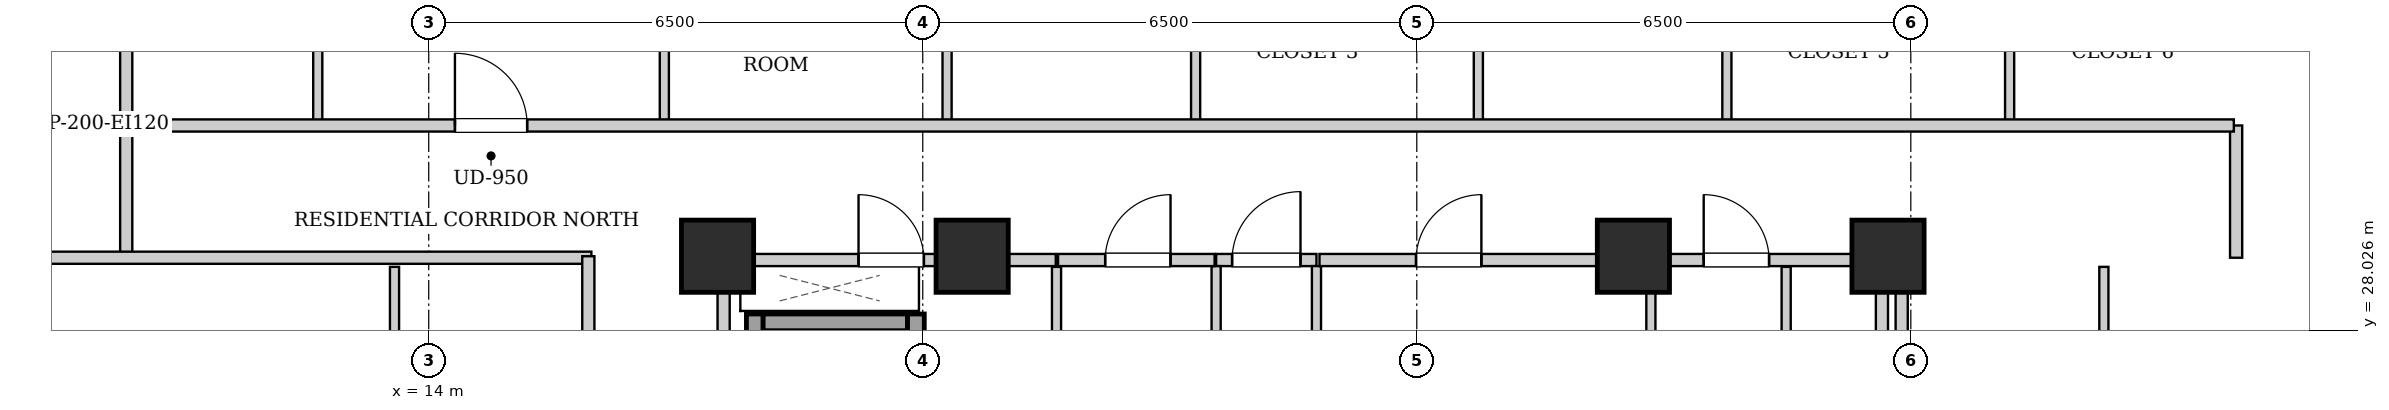
"""IFC4 building model, lengths in metres.
Left out: names, types, materials, properties, quantities, classifications, styles, units other than length and angle.
Written with IfcOpenShell. Run it as: python <this file> out.ifc"""

import sys

from ifc_helpers import new_model, si_unit, direction, frame, frame_2d, origin, origin_2d, place, context, subcontext, project, spatial, rectangle, extrude, element, fill, save


model = new_model("IFC4")
c1 = context("Model", 3, precision=1e-05, world=origin(), true_north=direction((0.0, 1.0)))
c2 = subcontext(c1, "Body", "Model", "MODEL_VIEW")
j1 = project(units=[si_unit("LENGTHUNIT", "METRE"), si_unit("PLANEANGLEUNIT", "RADIAN")], contexts=[c1])
p1 = place(None, origin())
s1 = spatial("IfcSite", under=j1, at=p1, CompositionType="ELEMENT")
p2 = place(p1, origin())
s2 = spatial("IfcBuilding", under=s1, at=p2, CompositionType="ELEMENT")
p3 = place(p2, frame((0.0, 0.0, 153.65)))
s3 = spatial("IfcBuildingStorey", under=s2, at=p3, CompositionType="ELEMENT", Elevation=153.65)
for number, where, z_axis, x_axis in (
    (1, (17.8, 29.0, 0.0), (0.0, 0.0, 1.0), (1.0, 0.0, 0.0)),
    (2, (21.15, 29.0, 0.0), (0.0, 0.0, 1.0), (1.0, 0.0, 0.0)),
    (3, (29.85, 29.0, 0.0), (0.0, 0.0, 1.0), (1.0, 0.0, 0.0)),
    (4, (33.2, 29.0, 0.0), (0.0, 0.0, 1.0), (1.0, 0.0, 0.0)),
):
    element("IfcColumn", number, at=place(p3, frame(where, z_axis=z_axis, x_axis=x_axis)), inside=s3, PredefinedType="COLUMN", context=c2, shape_type="SweptSolid", body=[
        extrude(rectangle(XDim=0.95, YDim=0.95, at=origin_2d()), origin(), (0.0, 0.0, 1.0), 3.25),
    ])
p4 = place(p3, frame((18.29, 24.1, 0.0), z_axis=(0.0, 0.0, 1.0), x_axis=(0.0, 1.0, 0.0)))
e5 = element("IfcWall", 5, at=p4, inside=s3, PredefinedType="SHEAR", context=c2, shape_type="SweptSolid", body=[
    extrude(rectangle(XDim=4.14, YDim=0.22, at=frame_2d((2.07, 0.0))), origin(), (0.0, 0.0, 1.0), 2.99),
])
p5 = place(p3, frame((18.4, 28.13, 0.0), z_axis=(0.0, 0.0, 1.0), x_axis=(1.0, 0.0, 0.0)))
e6 = element("IfcWall", 6, at=p5, inside=s3, PredefinedType="SHEAR", context=c2, shape_type="SweptSolid", body=[
    extrude(rectangle(XDim=1.9, YDim=0.22, at=frame_2d((0.95, 0.0))), origin(), (0.0, 0.0, 1.0), 2.99),
])
p6 = place(p3, frame((20.41, 26.06, 0.0), z_axis=(0.0, 0.0, 1.0), x_axis=(0.0, 1.0, 0.0)))
e7 = element("IfcWall", 7, at=p6, inside=s3, PredefinedType="SHEAR", context=c2, shape_type="SweptSolid", body=[
    extrude(rectangle(XDim=2.18, YDim=0.22, at=frame_2d((1.09, 0.0))), origin(), (0.0, 0.0, 1.0), 2.99),
])
for number, where, z_axis, x_axis in (
    (8, (17.88, 24.12, 0.0), (0.0, 0.0, 1.0), (0.0, 1.0, 0.0)),
    (9, (33.12, 24.12, 0.0), (0.0, 0.0, 1.0), (0.0, 1.0, 0.0)),
):
    element("IfcWall", number, at=place(p3, frame(where, z_axis=z_axis, x_axis=x_axis)), inside=s3, PredefinedType="PARTITIONING", context=c2, shape_type="SweptSolid", body=[
        extrude(rectangle(XDim=4.76, YDim=0.16, at=frame_2d((2.38, 0.0))), origin(), (0.0, 0.0, 1.0), 2.99),
    ])
p7 = place(p3, frame((24.36, 28.95, 0.0), z_axis=(0.0, 0.0, 1.0), x_axis=(1.0, 0.0, 0.0)))
e10 = element("IfcWall", 10, at=p7, inside=s3, PredefinedType="PARTITIONING", context=c2, shape_type="SweptSolid", body=[
    extrude(rectangle(XDim=1.32, YDim=0.16, at=frame_2d((0.66, 0.0))), origin(), (0.0, 0.0, 1.0), 2.442),
])
p8 = place(p7, frame((0.21, 0.0, 0.0)))
e11 = element("IfcOpeningElement", 11, at=p8, cuts=e10, PredefinedType="OPENING", context=c2, shape_type="SweptSolid", body=[
    extrude(rectangle(XDim=0.9, YDim=2.05, at=frame_2d((0.45, 1.025))), frame((0.0, 0.09, 0.0), z_axis=(0.0, -1.0, 0.0), x_axis=(1.0, 0.0, 0.0)), (0.0, 0.0, 1.0), 0.18),
])
p9 = place(p3, frame((17.96, 28.95, 0.0), z_axis=(0.0, 0.0, 1.0), x_axis=(1.0, 0.0, 0.0)))
e12 = element("IfcWall", 12, at=p9, inside=s3, PredefinedType="PARTITIONING", context=c2, shape_type="SweptSolid", body=[
    extrude(rectangle(XDim=4.29, YDim=0.16, at=frame_2d((2.145, 0.0))), origin(), (0.0, 0.0, 1.0), 2.442),
])
p10 = place(p9, frame((1.695, 0.0, 0.0)))
e13 = element("IfcOpeningElement", 13, at=p10, cuts=e12, PredefinedType="OPENING", context=c2, shape_type="SweptSolid", body=[
    extrude(rectangle(XDim=0.86, YDim=2.05, at=frame_2d((0.43, 1.025))), frame((0.0, 0.09, 0.0), z_axis=(0.0, -1.0, 0.0), x_axis=(1.0, 0.0, 0.0)), (0.0, 0.0, 1.0), 0.18),
])
for number, where, z_axis, x_axis in (
    (14, (24.36, 25.0, 0.0), (0.0, 0.0, 1.0), (0.0, 1.0, 0.0)),
    (15, (25.68, 25.0, 0.0), (0.0, 0.0, 1.0), (0.0, 1.0, 0.0)),
):
    element("IfcWall", number, at=place(p3, frame(where, z_axis=z_axis, x_axis=x_axis)), inside=s3, PredefinedType="PARTITIONING", context=c2, shape_type="SweptSolid", body=[
        extrude(rectangle(XDim=3.87, YDim=0.12, at=frame_2d((1.935, 0.0))), origin(), (0.0, 0.0, 1.0), 2.99),
    ])
p11 = place(p3, frame((30.08, 26.18, 0.0), z_axis=(0.0, 0.0, 1.0), x_axis=(0.0, 1.0, 0.0)))
e16 = element("IfcWall", 16, at=p11, inside=s3, PredefinedType="PARTITIONING", context=c2, shape_type="SweptSolid", body=[
    extrude(rectangle(XDim=2.68, YDim=0.12, at=frame_2d((1.34, 0.0))), origin(), (0.0, 0.0, 1.0), 2.99),
])
p12 = place(p3, frame((31.86, 26.2, 0.0), z_axis=(0.0, 0.0, 1.0), x_axis=(0.0, 1.0, 0.0)))
e17 = element("IfcWall", 17, at=p12, inside=s3, PredefinedType="PARTITIONING", context=c2, shape_type="SweptSolid", body=[
    extrude(rectangle(XDim=2.66, YDim=0.12, at=frame_2d((1.33, 0.0))), origin(), (0.0, 0.0, 1.0), 2.99),
])
p13 = place(p12, frame((0.92, 0.0, 0.0)))
e18 = element("IfcOpeningElement", 18, at=p13, cuts=e17, PredefinedType="OPENING", context=c2, shape_type="SweptSolid", body=[
    extrude(rectangle(XDim=0.86, YDim=2.05, at=frame_2d((0.43, 1.025))), frame((0.0, 0.07, 0.0), z_axis=(0.0, -1.0, 0.0), x_axis=(1.0, 0.0, 0.0)), (0.0, 0.0, 1.0), 0.14),
])
p14 = place(p3, frame((30.08, 28.95, 0.0), z_axis=(0.0, 0.0, 1.0), x_axis=(1.0, 0.0, 0.0)))
e19 = element("IfcWall", 19, at=p14, inside=s3, PredefinedType="PARTITIONING", context=c2, shape_type="SweptSolid", body=[
    extrude(rectangle(XDim=2.96, YDim=0.16, at=frame_2d((1.48, 0.0))), origin(), (0.0, 0.0, 1.0), 2.99),
])
p15 = place(p14, frame((0.695, 0.0, 0.0)))
e20 = element("IfcOpeningElement", 20, at=p15, cuts=e19, PredefinedType="OPENING", context=c2, shape_type="SweptSolid", body=[
    extrude(rectangle(XDim=0.86, YDim=2.05, at=frame_2d((0.43, 1.025))), frame((0.0, 0.09, 0.0), z_axis=(0.0, -1.0, 0.0), x_axis=(1.0, 0.0, 0.0)), (0.0, 0.0, 1.0), 0.18),
])
p16 = place(p3, frame((22.26, 25.0, 0.0), z_axis=(0.0, 0.0, 1.0), x_axis=(0.0, 1.0, 0.0)))
e21 = element("IfcWall", 21, at=p16, inside=s3, PredefinedType="PARTITIONING", context=c2, shape_type="SweptSolid", body=[
    extrude(rectangle(XDim=3.86, YDim=0.12, at=frame_2d((1.93, 0.0))), origin(), (0.0, 0.0, 1.0), 2.99),
])
p17 = place(p3, frame((22.28, 28.95, 0.0), z_axis=(0.0, 0.0, 1.0), x_axis=(1.0, 0.0, 0.0)))
e22 = element("IfcWall", 22, at=p17, inside=s3, PredefinedType="PARTITIONING", context=c2, shape_type="SweptSolid", body=[
    extrude(rectangle(XDim=2.06, YDim=0.16, at=frame_2d((1.03, 0.0))), origin(), (0.0, 0.0, 1.0), 2.442),
])
p18 = place(p17, frame((0.62, 0.0, 0.0)))
e23 = element("IfcOpeningElement", 23, at=p18, cuts=e22, PredefinedType="OPENING", context=c2, shape_type="SweptSolid", body=[
    extrude(rectangle(XDim=0.86, YDim=2.05, at=frame_2d((0.43, 1.025))), frame((0.0, 0.09, 0.0), z_axis=(0.0, -1.0, 0.0), x_axis=(1.0, 0.0, 0.0)), (0.0, 0.0, 1.0), 0.18),
])
p19 = place(p3, frame((25.72, 28.95, 0.0), z_axis=(0.0, 0.0, 1.0), x_axis=(1.0, 0.0, 0.0)))
e24 = element("IfcWall", 24, at=p19, inside=s3, PredefinedType="PARTITIONING", context=c2, shape_type="SweptSolid", body=[
    extrude(rectangle(XDim=4.32, YDim=0.16, at=frame_2d((2.16, 0.0))), origin(), (0.0, 0.0, 1.0), 2.442),
])
p20 = place(p19, frame((1.27, 0.0, 0.0)))
e25 = element("IfcOpeningElement", 25, at=p20, cuts=e24, PredefinedType="OPENING", context=c2, shape_type="SweptSolid", body=[
    extrude(rectangle(XDim=0.86, YDim=2.05, at=frame_2d((0.43, 1.025))), frame((0.0, 0.09, 0.0), z_axis=(0.0, -1.0, 0.0), x_axis=(1.0, 0.0, 0.0)), (0.0, 0.0, 1.0), 0.18),
])
for number, where, z_axis, x_axis in (
    (26, (10.02, 28.98, 0.0), (0.0, 0.0, 1.0), (0.0, 1.0, 0.0)),
    (27, (37.78, 28.98, 0.0), (0.0, 0.0, 1.0), (0.0, 1.0, 0.0)),
):
    element("IfcWall", number, at=place(p3, frame(where, z_axis=z_axis, x_axis=x_axis)), inside=s3, PredefinedType="PARTITIONING", context=c2, shape_type="SweptSolid", body=[
        extrude(rectangle(XDim=1.74, YDim=0.16, at=frame_2d((0.87, 0.0))), origin(), (0.0, 0.0, 1.0), 2.99),
    ])
p21 = place(p3, frame((7.78, 28.98, 0.0), z_axis=(0.0, 0.0, 1.0), x_axis=(1.0, 0.0, 0.0)))
e28 = element("IfcWall", 28, at=p21, inside=s3, PredefinedType="PARTITIONING", context=c2, shape_type="SweptSolid", body=[
    extrude(rectangle(XDim=8.36, YDim=0.16, at=frame_2d((4.18, 0.0))), origin(), (0.0, 0.0, 1.0), 2.442),
])
p22 = place(p3, frame((10.02, 30.76, 0.0), z_axis=(0.0, 0.0, 1.0), x_axis=(0.0, 1.0, 0.0)))
e29 = element("IfcWall", 29, at=p22, inside=s3, PredefinedType="PARTITIONING", context=c2, shape_type="SweptSolid", body=[
    extrude(rectangle(XDim=2.91, YDim=0.16, at=frame_2d((1.455, 0.0))), origin(), (0.0, 0.0, 1.0), 2.99),
])
p23 = place(p3, frame((12.54, 30.76, 0.0), z_axis=(0.0, 0.0, 1.0), x_axis=(0.0, 1.0, 0.0)))
e30 = element("IfcWall", 30, at=p23, inside=s3, PredefinedType="PARTITIONING", context=c2, shape_type="SweptSolid", body=[
    extrude(rectangle(XDim=2.85, YDim=0.12, at=frame_2d((1.425, 0.0))), origin(), (0.0, 0.0, 1.0), 2.99),
])
p24 = place(p23, frame((0.995, 0.0, 0.0)))
e31 = element("IfcOpeningElement", 31, at=p24, cuts=e30, PredefinedType="OPENING", context=c2, shape_type="SweptSolid", body=[
    extrude(rectangle(XDim=0.86, YDim=2.05, at=frame_2d((0.43, 1.025))), frame((0.0, 0.07, 0.0), z_axis=(0.0, -1.0, 0.0), x_axis=(1.0, 0.0, 0.0)), (0.0, 0.0, 1.0), 0.14),
])
p25 = place(p3, frame((17.1, 30.76, 0.0), z_axis=(0.0, 0.0, 1.0), x_axis=(0.0, 1.0, 0.0)))
e32 = element("IfcWall", 32, at=p25, inside=s3, PredefinedType="PARTITIONING", context=c2, shape_type="SweptSolid", body=[
    extrude(rectangle(XDim=2.85, YDim=0.12, at=frame_2d((1.425, 0.0))), origin(), (0.0, 0.0, 1.0), 2.99),
])
p26 = place(p25, frame((0.975, 0.0, 0.0)))
e33 = element("IfcOpeningElement", 33, at=p26, cuts=e32, PredefinedType="OPENING", context=c2, shape_type="SweptSolid", body=[
    extrude(rectangle(XDim=0.9, YDim=2.05, at=frame_2d((0.45, 1.025))), frame((0.0, 0.07, 0.0), z_axis=(0.0, -1.0, 0.0), x_axis=(1.0, 0.0, 0.0)), (0.0, 0.0, 1.0), 0.14),
])
p27 = place(p3, frame((20.82, 30.76, 0.0), z_axis=(0.0, 0.0, 1.0), x_axis=(0.0, 1.0, 0.0)))
e34 = element("IfcWall", 34, at=p27, inside=s3, PredefinedType="PARTITIONING", context=c2, shape_type="SweptSolid", body=[
    extrude(rectangle(XDim=2.85, YDim=0.12, at=frame_2d((1.425, 0.0))), origin(), (0.0, 0.0, 1.0), 2.99),
])
p28 = place(p27, frame((0.975, 0.0, 0.0)))
e35 = element("IfcOpeningElement", 35, at=p28, cuts=e34, PredefinedType="OPENING", context=c2, shape_type="SweptSolid", body=[
    extrude(rectangle(XDim=0.9, YDim=2.05, at=frame_2d((0.45, 1.025))), frame((0.0, 0.07, 0.0), z_axis=(0.0, -1.0, 0.0), x_axis=(1.0, 0.0, 0.0)), (0.0, 0.0, 1.0), 0.14),
])
p29 = place(p3, frame((24.09, 30.76, 0.0), z_axis=(0.0, 0.0, 1.0), x_axis=(0.0, 1.0, 0.0)))
e36 = element("IfcWall", 36, at=p29, inside=s3, PredefinedType="PARTITIONING", context=c2, shape_type="SweptSolid", body=[
    extrude(rectangle(XDim=2.85, YDim=0.12, at=frame_2d((1.425, 0.0))), origin(), (0.0, 0.0, 1.0), 2.99),
])
p30 = place(p29, frame((0.975, 0.0, 0.0)))
e37 = element("IfcOpeningElement", 37, at=p30, cuts=e36, PredefinedType="OPENING", context=c2, shape_type="SweptSolid", body=[
    extrude(rectangle(XDim=0.9, YDim=2.05, at=frame_2d((0.45, 1.025))), frame((0.0, 0.07, 0.0), z_axis=(0.0, -1.0, 0.0), x_axis=(1.0, 0.0, 0.0)), (0.0, 0.0, 1.0), 0.14),
])
p31 = place(p3, frame((27.81, 30.76, 0.0), z_axis=(0.0, 0.0, 1.0), x_axis=(0.0, 1.0, 0.0)))
e38 = element("IfcWall", 38, at=p31, inside=s3, PredefinedType="PARTITIONING", context=c2, shape_type="SweptSolid", body=[
    extrude(rectangle(XDim=2.85, YDim=0.12, at=frame_2d((1.425, 0.0))), origin(), (0.0, 0.0, 1.0), 2.99),
])
p32 = place(p31, frame((0.975, 0.0, 0.0)))
e39 = element("IfcOpeningElement", 39, at=p32, cuts=e38, PredefinedType="OPENING", context=c2, shape_type="SweptSolid", body=[
    extrude(rectangle(XDim=0.9, YDim=2.05, at=frame_2d((0.45, 1.025))), frame((0.0, 0.07, 0.0), z_axis=(0.0, -1.0, 0.0), x_axis=(1.0, 0.0, 0.0)), (0.0, 0.0, 1.0), 0.14),
])
p33 = place(p3, frame((31.08, 30.76, 0.0), z_axis=(0.0, 0.0, 1.0), x_axis=(0.0, 1.0, 0.0)))
e40 = element("IfcWall", 40, at=p33, inside=s3, PredefinedType="PARTITIONING", context=c2, shape_type="SweptSolid", body=[
    extrude(rectangle(XDim=2.85, YDim=0.12, at=frame_2d((1.425, 0.0))), origin(), (0.0, 0.0, 1.0), 2.99),
])
p34 = place(p33, frame((0.975, 0.0, 0.0)))
e41 = element("IfcOpeningElement", 41, at=p34, cuts=e40, PredefinedType="OPENING", context=c2, shape_type="SweptSolid", body=[
    extrude(rectangle(XDim=0.9, YDim=2.05, at=frame_2d((0.45, 1.025))), frame((0.0, 0.07, 0.0), z_axis=(0.0, -1.0, 0.0), x_axis=(1.0, 0.0, 0.0)), (0.0, 0.0, 1.0), 0.14),
])
p35 = place(p3, frame((34.8, 30.76, 0.0), z_axis=(0.0, 0.0, 1.0), x_axis=(0.0, 1.0, 0.0)))
e42 = element("IfcWall", 42, at=p35, inside=s3, PredefinedType="PARTITIONING", context=c2, shape_type="SweptSolid", body=[
    extrude(rectangle(XDim=2.85, YDim=0.12, at=frame_2d((1.425, 0.0))), origin(), (0.0, 0.0, 1.0), 2.99),
])
p36 = place(p35, frame((0.975, 0.0, 0.0)))
e43 = element("IfcOpeningElement", 43, at=p36, cuts=e42, PredefinedType="OPENING", context=c2, shape_type="SweptSolid", body=[
    extrude(rectangle(XDim=0.9, YDim=2.05, at=frame_2d((0.45, 1.025))), frame((0.0, 0.07, 0.0), z_axis=(0.0, -1.0, 0.0), x_axis=(1.0, 0.0, 0.0)), (0.0, 0.0, 1.0), 0.14),
])
p37 = place(p3, frame((13.55, 24.552, 0.0), z_axis=(0.0, 0.0, 1.0), x_axis=(0.0, 1.0, 0.0)))
e44 = element("IfcWall", 44, at=p37, inside=s3, PredefinedType="PARTITIONING", context=c2, shape_type="SweptSolid", body=[
    extrude(rectangle(XDim=4.308, YDim=0.12, at=frame_2d((2.154, 0.0))), origin(), (0.0, 0.0, 1.0), 2.99),
])
p38 = place(p37, frame((1.704, 0.0, 0.0)))
e45 = element("IfcOpeningElement", 45, at=p38, cuts=e44, PredefinedType="OPENING", context=c2, shape_type="SweptSolid", body=[
    extrude(rectangle(XDim=0.9, YDim=2.05, at=frame_2d((0.45, 1.025))), frame((0.0, 0.07, 0.0), z_axis=(0.0, -1.0, 0.0), x_axis=(1.0, 0.0, 0.0)), (0.0, 0.0, 1.0), 0.14),
])
p39 = place(p3, frame((36.04, 24.552, 0.0), z_axis=(0.0, 0.0, 1.0), x_axis=(0.0, 1.0, 0.0)))
e46 = element("IfcWall", 46, at=p39, inside=s3, PredefinedType="PARTITIONING", context=c2, shape_type="SweptSolid", body=[
    extrude(rectangle(XDim=4.308, YDim=0.12, at=frame_2d((2.154, 0.0))), origin(), (0.0, 0.0, 1.0), 2.99),
])
p40 = place(p39, frame((1.704, 0.0, 0.0)))
e47 = element("IfcOpeningElement", 47, at=p40, cuts=e46, PredefinedType="OPENING", context=c2, shape_type="SweptSolid", body=[
    extrude(rectangle(XDim=0.9, YDim=2.05, at=frame_2d((0.45, 1.025))), frame((0.0, 0.07, 0.0), z_axis=(0.0, -1.0, 0.0), x_axis=(1.0, 0.0, 0.0)), (0.0, 0.0, 1.0), 0.14),
])
p41 = place(p3, frame((10.05, 30.72, 0.0), z_axis=(0.0, 0.0, 1.0), x_axis=(1.0, 0.0, 0.0)))
e48 = element("IfcWall", 48, at=p41, inside=s3, PredefinedType="PARTITIONING", context=c2, shape_type="SweptSolid", body=[
    extrude(rectangle(XDim=27.7, YDim=0.16, at=frame_2d((13.85, 0.0))), origin(), (0.0, 0.0, 1.0), 2.99),
])
p42 = place(p41, frame((4.295, 0.0, 0.0)))
e49 = element("IfcOpeningElement", 49, at=p42, cuts=e48, PredefinedType="OPENING", context=c2, shape_type="SweptSolid", body=[
    extrude(rectangle(XDim=0.95, YDim=2.1, at=frame_2d((0.475, 1.05))), frame((0.0, 0.09, 0.0), z_axis=(0.0, -1.0, 0.0), x_axis=(1.0, 0.0, 0.0)), (0.0, 0.0, 1.0), 0.18),
])
p43 = place(p3, frame((16.1, 15.07, 0.0), z_axis=(0.0, 0.0, 1.0), x_axis=(0.0, 1.0, 0.0)))
e50 = element("IfcWall", 50, at=p43, inside=s3, PredefinedType="PARTITIONING", context=c2, shape_type="SweptSolid", body=[
    extrude(rectangle(XDim=13.93, YDim=0.16, at=frame_2d((6.965, 0.0))), origin(), (0.0, 0.0, 1.0), 2.99),
])
p44 = place(p43, frame((4.385, 0.0, 0.0)))
e51 = element("IfcOpeningElement", 51, at=p44, cuts=e50, PredefinedType="OPENING", context=c2, shape_type="SweptSolid", body=[
    extrude(rectangle(XDim=0.95, YDim=2.1, at=frame_2d((0.475, 1.05))), frame((0.0, 0.09, 0.0), z_axis=(0.0, -1.0, 0.0), x_axis=(1.0, 0.0, 0.0)), (0.0, 0.0, 1.0), 0.18),
])
p45 = place(p3, frame((33.38, 15.02, 0.0), z_axis=(0.0, 0.0, 1.0), x_axis=(0.0, 1.0, 0.0)))
e52 = element("IfcWall", 52, at=p45, inside=s3, PredefinedType="PARTITIONING", context=c2, shape_type="SweptSolid", body=[
    extrude(rectangle(XDim=13.98, YDim=0.16, at=frame_2d((6.99, 0.0))), origin(), (0.0, 0.0, 1.0), 2.99),
])
p46 = place(p8, origin())
e53 = element("IfcDoor", 53, at=p46, inside=s3, OperationType="SINGLE_SWING_RIGHT", PredefinedType="DOOR", context=c2, shape_type="SweptSolid", body=[
    extrude(rectangle(XDim=0.9, YDim=2.05, at=frame_2d((0.45, 1.025))), frame((0.0, 0.025, 0.0), z_axis=(0.0, -1.0, 0.0), x_axis=(1.0, 0.0, 0.0)), (0.0, 0.0, 1.0), 0.05),
])
fill(e11, e53)
p47 = place(p10, origin())
e54 = element("IfcDoor", 54, at=p47, inside=s3, OperationType="SINGLE_SWING_LEFT", PredefinedType="DOOR", context=c2, shape_type="SweptSolid", body=[
    extrude(rectangle(XDim=0.86, YDim=2.05, at=frame_2d((0.43, 1.025))), frame((0.0, 0.025, 0.0), z_axis=(0.0, -1.0, 0.0), x_axis=(1.0, 0.0, 0.0)), (0.0, 0.0, 1.0), 0.05),
])
fill(e13, e54)
p48 = place(p15, origin())
e55 = element("IfcDoor", 55, at=p48, inside=s3, OperationType="SINGLE_SWING_LEFT", PredefinedType="DOOR", context=c2, shape_type="SweptSolid", body=[
    extrude(rectangle(XDim=0.86, YDim=2.05, at=frame_2d((0.43, 1.025))), frame((0.0, 0.025, 0.0), z_axis=(0.0, -1.0, 0.0), x_axis=(1.0, 0.0, 0.0)), (0.0, 0.0, 1.0), 0.05),
])
fill(e20, e55)
p49 = place(p18, origin())
e56 = element("IfcDoor", 56, at=p49, inside=s3, OperationType="SINGLE_SWING_RIGHT", PredefinedType="DOOR", context=c2, shape_type="SweptSolid", body=[
    extrude(rectangle(XDim=0.86, YDim=2.05, at=frame_2d((0.43, 1.025))), frame((0.0, 0.025, 0.0), z_axis=(0.0, -1.0, 0.0), x_axis=(1.0, 0.0, 0.0)), (0.0, 0.0, 1.0), 0.05),
])
fill(e23, e56)
p50 = place(p20, origin())
e57 = element("IfcDoor", 57, at=p50, inside=s3, OperationType="SINGLE_SWING_RIGHT", PredefinedType="DOOR", context=c2, shape_type="SweptSolid", body=[
    extrude(rectangle(XDim=0.86, YDim=2.05, at=frame_2d((0.43, 1.025))), frame((0.0, 0.025, 0.0), z_axis=(0.0, -1.0, 0.0), x_axis=(1.0, 0.0, 0.0)), (0.0, 0.0, 1.0), 0.05),
])
fill(e25, e57)
p51 = place(p42, origin())
e58 = element("IfcDoor", 58, at=p51, inside=s3, OperationType="SINGLE_SWING_LEFT", PredefinedType="DOOR", context=c2, shape_type="SweptSolid", body=[
    extrude(rectangle(XDim=0.95, YDim=2.1, at=frame_2d((0.475, 1.05))), frame((0.0, 0.025, 0.0), z_axis=(0.0, -1.0, 0.0), x_axis=(1.0, 0.0, 0.0)), (0.0, 0.0, 1.0), 0.05),
])
fill(e49, e58)
save(model, sys.argv[1])
